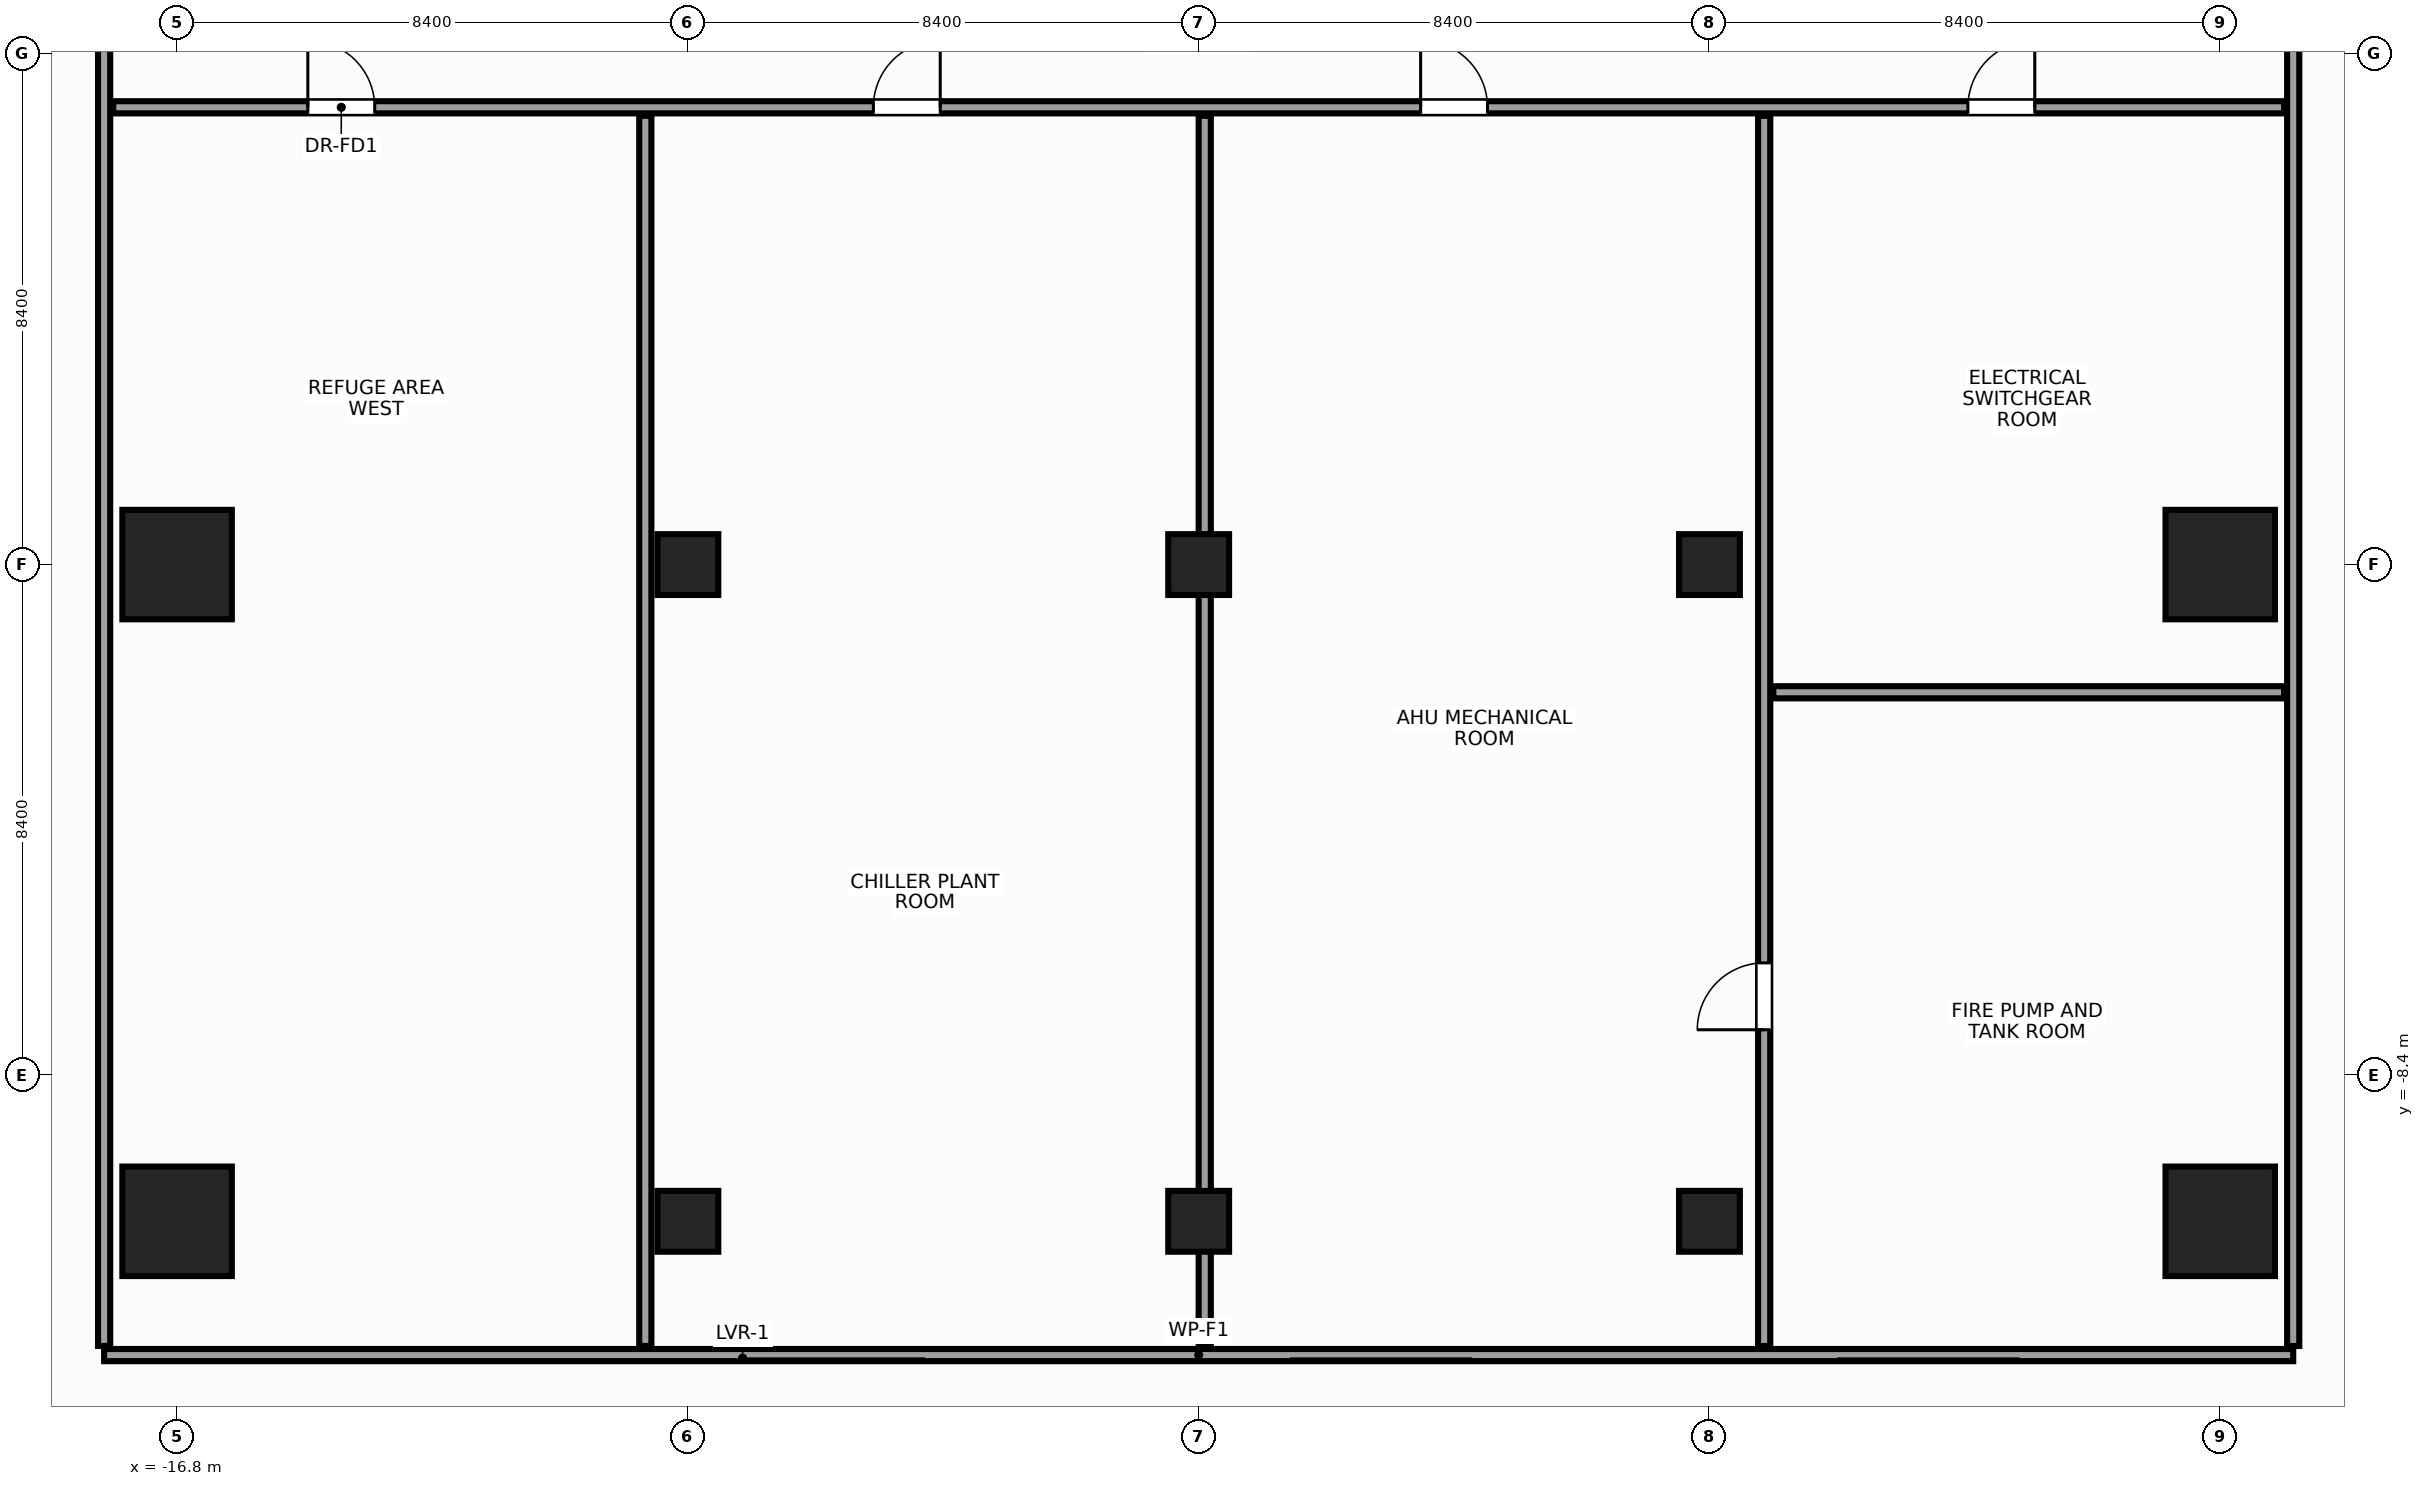
"""IFC4 building model, lengths in metres.
Left out: names, types, materials, properties, quantities, classifications, styles, units other than length and angle.
Written with IfcOpenShell. Run it as: python <this file> out.ifc"""

import sys

from ifc_helpers import new_model, si_unit, direction, frame, frame_2d, origin, origin_2d, place, context, subcontext, project, spatial, rectangle, hollow_rectangle, extrude, source, transform, mapped, element, fill, save


model = new_model("IFC4")
c1 = context("Model", 3, precision=1e-05, world=origin(), true_north=direction((0.0, 1.0)))
c2 = subcontext(c1, "Body", "Model", "MODEL_VIEW")
j1 = project(units=[si_unit("LENGTHUNIT", "METRE"), si_unit("PLANEANGLEUNIT", "RADIAN")], contexts=[c1])
p1 = place(None, origin())
s1 = spatial("IfcSite", under=j1, at=p1, CompositionType="ELEMENT")
p2 = place(p1, origin())
s2 = spatial("IfcBuilding", under=s1, at=p2, CompositionType="ELEMENT")
p3 = place(p2, frame((0.0, 0.0, 70.4)))
s3 = spatial("IfcBuildingStorey", under=s2, at=p3, CompositionType="ELEMENT", Elevation=70.4)
m1 = source(origin(), c2, "Body", "SweptSolid", [
    extrude(rectangle(XDim=1.8, YDim=1.8, at=origin_2d()), origin(), (0.0, 0.0, 1.0), 7.2),
])
for number, where, z_axis, x_axis in (
    (1, (-16.8, -10.8, 0.0), (0.0, 0.0, 1.0), (1.0, 0.0, 0.0)),
    (2, (-16.8, 0.0, 0.0), (0.0, 0.0, 1.0), (1.0, 0.0, 0.0)),
    (3, (16.8, -10.8, 0.0), (0.0, 0.0, 1.0), (1.0, 0.0, 0.0)),
    (4, (16.8, 0.0, 0.0), (0.0, 0.0, 1.0), (1.0, 0.0, 0.0)),
):
    element("IfcColumn", number, at=place(p3, frame(where, z_axis=z_axis, x_axis=x_axis)), inside=s3, PredefinedType="COLUMN", context=c2, shape_type="MappedRepresentation", body=[
        mapped(m1, transform((0.0, 0.0, 0.0), x_axis=(1.0, 0.0, 0.0), y_axis=(0.0, 1.0, 0.0), z_axis=(0.0, 0.0, 1.0), scale=1.0)),
    ])
m2 = source(origin(), c2, "Body", "SweptSolid", [
    extrude(hollow_rectangle(XDim=1.0, YDim=1.0, WallThickness=0.045, at=origin_2d()), origin(), (0.0, 0.0, 1.0), 7.2),
])
for number, where, z_axis, x_axis in (
    (5, (-8.4, 0.0, 0.0), (0.0, 0.0, 1.0), (1.0, 0.0, 0.0)),
    (6, (-8.4, -10.8, 0.0), (0.0, 0.0, 1.0), (1.0, 0.0, 0.0)),
    (7, (8.4, 0.0, 0.0), (0.0, 0.0, 1.0), (1.0, 0.0, 0.0)),
    (8, (8.4, -10.8, 0.0), (0.0, 0.0, 1.0), (1.0, 0.0, 0.0)),
):
    element("IfcColumn", number, at=place(p3, frame(where, z_axis=z_axis, x_axis=x_axis)), inside=s3, PredefinedType="COLUMN", context=c2, shape_type="MappedRepresentation", body=[
        mapped(m2, transform((0.0, 0.0, 0.0), x_axis=(1.0, 0.0, 0.0), y_axis=(0.0, 1.0, 0.0), z_axis=(0.0, 0.0, 1.0), scale=1.0)),
    ])
m3 = source(origin(), c2, "Body", "SweptSolid", [
    extrude(rectangle(XDim=1.0, YDim=1.0, at=origin_2d()), origin(), (0.0, 0.0, 1.0), 7.2),
])
for number, where, z_axis, x_axis in (
    (9, (0.0, -10.8, 0.0), (0.0, 0.0, 1.0), (1.0, 0.0, 0.0)),
    (10, (0.0, 0.0, 0.0), (0.0, 0.0, 1.0), (1.0, 0.0, 0.0)),
):
    element("IfcColumn", number, at=place(p3, frame(where, z_axis=z_axis, x_axis=x_axis)), inside=s3, PredefinedType="COLUMN", context=c2, shape_type="MappedRepresentation", body=[
        mapped(m3, transform((0.0, 0.0, 0.0), x_axis=(1.0, 0.0, 0.0), y_axis=(0.0, 1.0, 0.0), z_axis=(0.0, 0.0, 1.0), scale=1.0)),
    ])
m4 = source(origin(), c2, "Body", "SweptSolid", [
    extrude(rectangle(XDim=36.0, YDim=0.2, at=frame_2d((18.0, 0.0))), origin(), (0.0, 0.0, 1.0), 6.485),
])
p4 = place(p3, frame((-18.0, -13.0, 0.0), z_axis=(0.0, 0.0, 1.0), x_axis=(1.0, 0.0, 0.0)))
e11 = element("IfcWall", 11, at=p4, inside=s3, PredefinedType="PARTITIONING", context=c2, shape_type="MappedRepresentation", body=[
    mapped(m4, transform((0.0, 0.0, 0.0), x_axis=(1.0, 0.0, 0.0), y_axis=(0.0, 1.0, 0.0), z_axis=(0.0, 0.0, 1.0), scale=1.0)),
])
m5 = source(origin(), c2, "Body", "SweptSolid", [
    extrude(rectangle(XDim=22.85, YDim=0.2, at=frame_2d((11.425, 0.0))), origin(), (0.0, 0.0, 1.0), 6.285),
])
for number, where, z_axis, x_axis in (
    (12, (-18.0, -12.85, 0.0), (0.0, 0.0, 1.0), (0.0, 1.0, 0.0)),
    (13, (18.0, -12.85, 0.0), (0.0, 0.0, 1.0), (0.0, 1.0, 0.0)),
):
    element("IfcWall", number, at=place(p3, frame(where, z_axis=z_axis, x_axis=x_axis)), inside=s3, PredefinedType="PARTITIONING", context=c2, shape_type="MappedRepresentation", body=[
        mapped(m5, transform((0.0, 0.0, 0.0), x_axis=(1.0, 0.0, 0.0), y_axis=(0.0, 1.0, 0.0), z_axis=(0.0, 0.0, 1.0), scale=1.0)),
    ])
m6 = source(origin(), c2, "Body", "SweptSolid", [
    extrude(rectangle(XDim=35.7, YDim=0.2, at=frame_2d((17.85, 0.0))), origin(), (0.0, 0.0, 1.0), 6.285),
])
p5 = place(p3, frame((-17.85, 7.52, 0.0), z_axis=(0.0, 0.0, 1.0), x_axis=(1.0, 0.0, 0.0)))
e14 = element("IfcWall", 14, at=p5, inside=s3, PredefinedType="PARTITIONING", context=c2, shape_type="MappedRepresentation", body=[
    mapped(m6, transform((0.0, 0.0, 0.0), x_axis=(1.0, 0.0, 0.0), y_axis=(0.0, 1.0, 0.0), z_axis=(0.0, 0.0, 1.0), scale=1.0)),
])
p6 = place(p5, frame((3.2, 0.0, 0.0)))
e15 = element("IfcOpeningElement", 15, at=p6, cuts=e14, PredefinedType="OPENING", context=c2, shape_type="SweptSolid", body=[
    extrude(rectangle(XDim=1.1, YDim=2.15, at=frame_2d((0.55, 1.075))), frame((0.0, 0.112, 0.0), z_axis=(0.0, -1.0, 0.0), x_axis=(1.0, 0.0, 0.0)), (0.0, 0.0, 1.0), 0.224),
])
p7 = place(p5, frame((12.5, 0.0, 0.0)))
e16 = element("IfcOpeningElement", 16, at=p7, cuts=e14, PredefinedType="OPENING", context=c2, shape_type="SweptSolid", body=[
    extrude(rectangle(XDim=1.1, YDim=2.15, at=frame_2d((0.55, 1.075))), frame((0.0, 0.112, 0.0), z_axis=(0.0, -1.0, 0.0), x_axis=(1.0, 0.0, 0.0)), (0.0, 0.0, 1.0), 0.224),
])
p8 = place(p5, frame((21.5, 0.0, 0.0)))
e17 = element("IfcOpeningElement", 17, at=p8, cuts=e14, PredefinedType="OPENING", context=c2, shape_type="SweptSolid", body=[
    extrude(rectangle(XDim=1.1, YDim=2.15, at=frame_2d((0.55, 1.075))), frame((0.0, 0.112, 0.0), z_axis=(0.0, -1.0, 0.0), x_axis=(1.0, 0.0, 0.0)), (0.0, 0.0, 1.0), 0.224),
])
p9 = place(p5, frame((30.5, 0.0, 0.0)))
e18 = element("IfcOpeningElement", 18, at=p9, cuts=e14, PredefinedType="OPENING", context=c2, shape_type="SweptSolid", body=[
    extrude(rectangle(XDim=1.1, YDim=2.15, at=frame_2d((0.55, 1.075))), frame((0.0, 0.112, 0.0), z_axis=(0.0, -1.0, 0.0), x_axis=(1.0, 0.0, 0.0)), (0.0, 0.0, 1.0), 0.224),
])
m7 = source(origin(), c2, "Body", "SweptSolid", [
    extrude(rectangle(XDim=20.23, YDim=0.2, at=frame_2d((10.115, 0.0))), origin(), (0.0, 0.0, 1.0), 6.185),
])
for number, where, z_axis, x_axis in (
    (19, (-9.1, -12.85, 0.0), (0.0, 0.0, 1.0), (0.0, 1.0, 0.0)),
    (20, (0.1, -12.85, 0.0), (0.0, 0.0, 1.0), (0.0, 1.0, 0.0)),
):
    element("IfcWall", number, at=place(p3, frame(where, z_axis=z_axis, x_axis=x_axis)), inside=s3, PredefinedType="PARTITIONING", context=c2, shape_type="MappedRepresentation", body=[
        mapped(m7, transform((0.0, 0.0, 0.0), x_axis=(1.0, 0.0, 0.0), y_axis=(0.0, 1.0, 0.0), z_axis=(0.0, 0.0, 1.0), scale=1.0)),
    ])
p10 = place(p3, frame((9.3, -12.85, 0.0), z_axis=(0.0, 0.0, 1.0), x_axis=(0.0, 1.0, 0.0)))
e21 = element("IfcWall", 21, at=p10, inside=s3, PredefinedType="PARTITIONING", context=c2, shape_type="MappedRepresentation", body=[
    mapped(m7, transform((0.0, 0.0, 0.0), x_axis=(1.0, 0.0, 0.0), y_axis=(0.0, 1.0, 0.0), z_axis=(0.0, 0.0, 1.0), scale=1.0)),
])
p11 = place(p10, frame((5.2, 0.0, 0.0)))
e22 = element("IfcOpeningElement", 22, at=p11, cuts=e21, PredefinedType="OPENING", context=c2, shape_type="SweptSolid", body=[
    extrude(rectangle(XDim=1.1, YDim=2.15, at=frame_2d((0.55, 1.075))), frame((0.0, 0.112, 0.0), z_axis=(0.0, -1.0, 0.0), x_axis=(1.0, 0.0, 0.0)), (0.0, 0.0, 1.0), 0.224),
])
m8 = source(origin(), c2, "Body", "SweptSolid", [
    extrude(rectangle(XDim=8.4, YDim=0.2, at=frame_2d((4.2, 0.0))), origin(), (0.0, 0.0, 1.0), 6.285),
])
p12 = place(p3, frame((9.45, -2.1, 0.0), z_axis=(0.0, 0.0, 1.0), x_axis=(1.0, 0.0, 0.0)))
e23 = element("IfcWall", 23, at=p12, inside=s3, PredefinedType="PARTITIONING", context=c2, shape_type="MappedRepresentation", body=[
    mapped(m8, transform((0.0, 0.0, 0.0), x_axis=(1.0, 0.0, 0.0), y_axis=(0.0, 1.0, 0.0), z_axis=(0.0, 0.0, 1.0), scale=1.0)),
])
m9 = source(origin(), c2, "Body", "SweptSolid", [
    extrude(rectangle(XDim=1.1, YDim=2.15, at=frame_2d((0.55, 1.075))), frame((0.0, 0.025, 0.0), z_axis=(0.0, -1.0, 0.0), x_axis=(1.0, 0.0, 0.0)), (0.0, 0.0, 1.0), 0.05),
])
p13 = place(p6, origin())
e24 = element("IfcDoor", 24, at=p13, inside=s3, OperationType="SINGLE_SWING_LEFT", PredefinedType="DOOR", context=c2, shape_type="MappedRepresentation", body=[
    mapped(m9, transform((0.0, 0.0, 0.0), x_axis=(1.0, 0.0, 0.0), y_axis=(0.0, 1.0, 0.0), z_axis=(0.0, 0.0, 1.0), scale=1.0)),
])
fill(e15, e24)
p14 = place(p7, origin())
e25 = element("IfcDoor", 25, at=p14, inside=s3, OperationType="SINGLE_SWING_RIGHT", PredefinedType="DOOR", context=c2, shape_type="MappedRepresentation", body=[
    mapped(m9, transform((0.0, 0.0, 0.0), x_axis=(1.0, 0.0, 0.0), y_axis=(0.0, 1.0, 0.0), z_axis=(0.0, 0.0, 1.0), scale=1.0)),
])
fill(e16, e25)
p15 = place(p8, origin())
e26 = element("IfcDoor", 26, at=p15, inside=s3, OperationType="SINGLE_SWING_LEFT", PredefinedType="DOOR", context=c2, shape_type="MappedRepresentation", body=[
    mapped(m9, transform((0.0, 0.0, 0.0), x_axis=(1.0, 0.0, 0.0), y_axis=(0.0, 1.0, 0.0), z_axis=(0.0, 0.0, 1.0), scale=1.0)),
])
fill(e17, e26)
p16 = place(p9, origin())
e27 = element("IfcDoor", 27, at=p16, inside=s3, OperationType="SINGLE_SWING_RIGHT", PredefinedType="DOOR", context=c2, shape_type="MappedRepresentation", body=[
    mapped(m9, transform((0.0, 0.0, 0.0), x_axis=(1.0, 0.0, 0.0), y_axis=(0.0, 1.0, 0.0), z_axis=(0.0, 0.0, 1.0), scale=1.0)),
])
fill(e18, e27)
p17 = place(p11, origin())
e28 = element("IfcDoor", 28, at=p17, inside=s3, OperationType="SINGLE_SWING_LEFT", PredefinedType="DOOR", context=c2, shape_type="MappedRepresentation", body=[
    mapped(m9, transform((0.0, 0.0, 0.0), x_axis=(1.0, 0.0, 0.0), y_axis=(0.0, 1.0, 0.0), z_axis=(0.0, 0.0, 1.0), scale=1.0)),
])
fill(e22, e28)
save(model, sys.argv[1])
